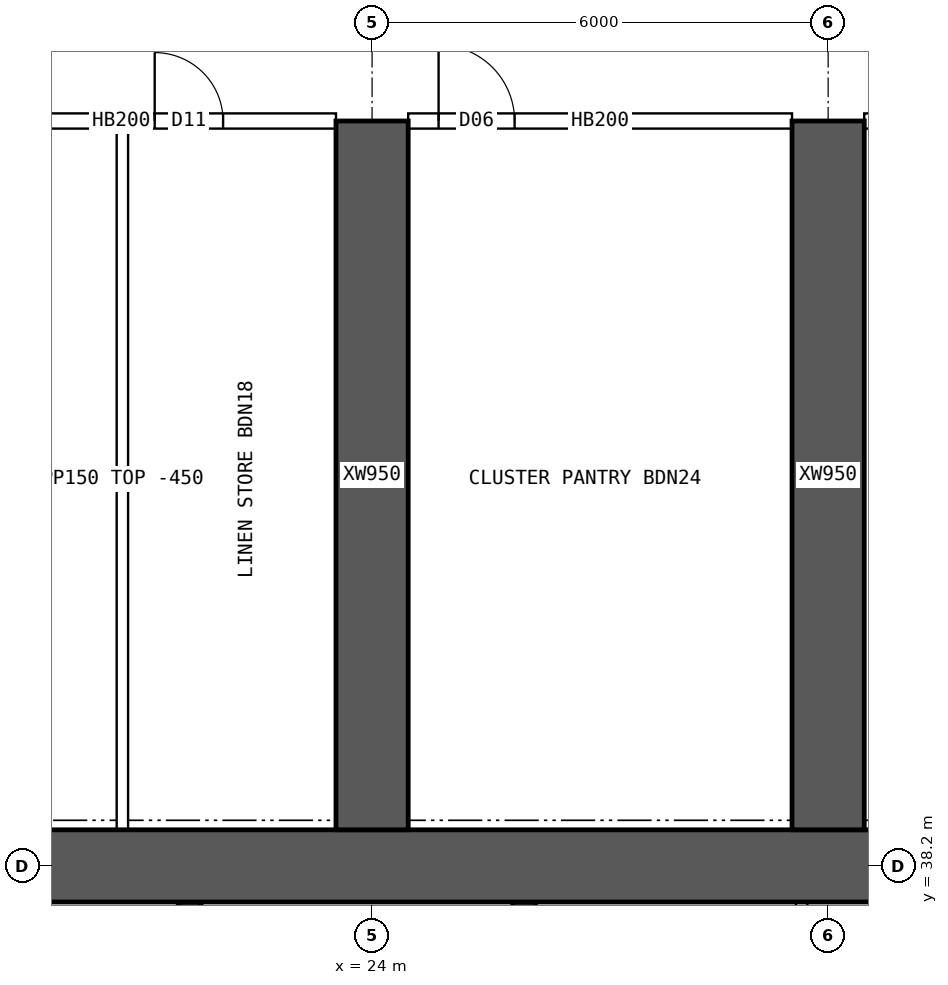
"""IFC4 building model, lengths in metres.
Left out: names, types, materials, properties, quantities, classifications, styles, units other than length and angle.
Written with IfcOpenShell. Run it as: python <this file> out.ifc"""

import sys

from ifc_helpers import new_model, si_unit, direction, frame, frame_2d, origin, place, context, subcontext, project, spatial, rectangle, extrude, element, fill, save


model = new_model("IFC4")
c1 = context("Model", 3, precision=1e-05, world=origin(), true_north=direction((0.0, 1.0)))
c2 = subcontext(c1, "Body", "Model", "MODEL_VIEW")
j1 = project(units=[si_unit("LENGTHUNIT", "METRE"), si_unit("PLANEANGLEUNIT", "RADIAN")], contexts=[c1])
p1 = place(None, origin())
s1 = spatial("IfcSite", under=j1, at=p1, CompositionType="ELEMENT")
p2 = place(p1, origin())
s2 = spatial("IfcBuilding", under=s1, at=p2, CompositionType="ELEMENT")
p3 = place(p2, frame((0.0, 0.0, 95.65)))
s3 = spatial("IfcBuildingStorey", under=s2, at=p3, CompositionType="ELEMENT", Elevation=95.65)
p4 = place(p3, frame((18.0, 38.2, 0.0), z_axis=(0.0, 0.0, 1.0), x_axis=(1.0, 0.0, 0.0)))
e1 = element("IfcWall", 1, at=p4, inside=s3, PredefinedType="SHEAR", context=c2, shape_type="SweptSolid", body=[
    extrude(rectangle(XDim=48.0, YDim=0.95, at=frame_2d((24.0, 0.0))), origin(), (0.0, 0.0, 1.0), 3.75),
])
for number, where, z_axis, x_axis in (
    (2, (21.6, 34.75, 0.0), (0.0, 0.0, 1.0), (0.0, 1.0, 0.0)),
    (3, (26.0, 34.75, 0.0), (0.0, 0.0, 1.0), (0.0, 1.0, 0.0)),
):
    element("IfcWall", number, at=place(p3, frame(where, z_axis=z_axis, x_axis=x_axis)), inside=s3, PredefinedType="SHEAR", context=c2, shape_type="SweptSolid", body=[
        extrude(rectangle(XDim=2.975, YDim=0.3, at=frame_2d((1.488, 0.0))), origin(), (0.0, 0.0, 1.0), 3.75),
    ])
for number, where, z_axis, x_axis in (
    (4, (24.0, 38.675, 0.0), (0.0, 0.0, 1.0), (0.0, 1.0, 0.0)),
    (5, (30.0, 38.675, 0.0), (0.0, 0.0, 1.0), (0.0, 1.0, 0.0)),
):
    element("IfcWall", number, at=place(p3, frame(where, z_axis=z_axis, x_axis=x_axis)), inside=s3, PredefinedType="SHEAR", context=c2, shape_type="SweptSolid", body=[
        extrude(rectangle(XDim=9.325, YDim=0.95, at=frame_2d((4.663, 0.0))), origin(), (0.0, 0.0, 1.0), 3.75),
    ])
p5 = place(p3, frame((29.651, 34.75, 0.0), z_axis=(0.0, 0.0, 1.0), x_axis=(0.0, 1.0, 0.0)))
e6 = element("IfcWall", 6, at=p5, inside=s3, PredefinedType="SOLIDWALL", context=c2, shape_type="SweptSolid", body=[
    extrude(rectangle(XDim=2.975, YDim=0.15, at=frame_2d((1.488, 0.0))), origin(), (0.0, 0.0, 1.0), 3.3),
])
p6 = place(p3, frame((18.475, 48.0, 0.0), z_axis=(0.0, 0.0, 1.0), x_axis=(1.0, 0.0, 0.0)))
e7 = element("IfcWall", 7, at=p6, inside=s3, PredefinedType="SOLIDWALL", context=c2, shape_type="SweptSolid", body=[
    extrude(rectangle(XDim=5.05, YDim=0.2, at=frame_2d((2.525, 0.0))), origin(), (0.0, 0.0, 1.0), 3.3),
])
p7 = place(p6, frame((0.35, 0.0, 0.0)))
e8 = element("IfcOpeningElement", 8, at=p7, cuts=e7, PredefinedType="OPENING", context=c2, shape_type="SweptSolid", body=[
    extrude(rectangle(XDim=0.9, YDim=2.1, at=frame_2d((0.45, 1.05))), frame((0.0, 0.11, 0.0), z_axis=(0.0, -1.0, 0.0), x_axis=(1.0, 0.0, 0.0)), (0.0, 0.0, 1.0), 0.22),
])
p8 = place(p6, frame((2.665, 0.0, 0.0)))
e9 = element("IfcOpeningElement", 9, at=p8, cuts=e7, PredefinedType="OPENING", context=c2, shape_type="SweptSolid", body=[
    extrude(rectangle(XDim=0.9, YDim=2.1, at=frame_2d((0.45, 1.05))), frame((0.0, 0.11, 0.0), z_axis=(0.0, -1.0, 0.0), x_axis=(1.0, 0.0, 0.0)), (0.0, 0.0, 1.0), 0.22),
])
p9 = place(p3, frame((24.475, 48.0, 0.0), z_axis=(0.0, 0.0, 1.0), x_axis=(1.0, 0.0, 0.0)))
e10 = element("IfcWall", 10, at=p9, inside=s3, PredefinedType="SOLIDWALL", context=c2, shape_type="SweptSolid", body=[
    extrude(rectangle(XDim=5.05, YDim=0.2, at=frame_2d((2.525, 0.0))), origin(), (0.0, 0.0, 1.0), 3.3),
])
p10 = place(p9, frame((0.4, 0.0, 0.0)))
e11 = element("IfcOpeningElement", 11, at=p10, cuts=e10, PredefinedType="OPENING", context=c2, shape_type="SweptSolid", body=[
    extrude(rectangle(XDim=1.0, YDim=2.1, at=frame_2d((0.5, 1.05))), frame((0.0, 0.11, 0.0), z_axis=(0.0, -1.0, 0.0), x_axis=(1.0, 0.0, 0.0)), (0.0, 0.0, 1.0), 0.22),
])
p11 = place(p3, frame((30.475, 48.0, 0.0), z_axis=(0.0, 0.0, 1.0), x_axis=(1.0, 0.0, 0.0)))
e12 = element("IfcWall", 12, at=p11, inside=s3, PredefinedType="SOLIDWALL", context=c2, shape_type="SweptSolid", body=[
    extrude(rectangle(XDim=5.05, YDim=0.2, at=frame_2d((2.525, 0.0))), origin(), (0.0, 0.0, 1.0), 3.3),
])
p12 = place(p11, frame((0.35, 0.0, 0.0)))
e13 = element("IfcOpeningElement", 13, at=p12, cuts=e12, PredefinedType="OPENING", context=c2, shape_type="SweptSolid", body=[
    extrude(rectangle(XDim=0.9, YDim=2.1, at=frame_2d((0.45, 1.05))), frame((0.0, 0.11, 0.0), z_axis=(0.0, -1.0, 0.0), x_axis=(1.0, 0.0, 0.0)), (0.0, 0.0, 1.0), 0.22),
])
p13 = place(p11, frame((2.705, 0.0, 0.0)))
e14 = element("IfcOpeningElement", 14, at=p13, cuts=e12, PredefinedType="OPENING", context=c2, shape_type="SweptSolid", body=[
    extrude(rectangle(XDim=0.9, YDim=2.1, at=frame_2d((0.45, 1.05))), frame((0.0, 0.11, 0.0), z_axis=(0.0, -1.0, 0.0), x_axis=(1.0, 0.0, 0.0)), (0.0, 0.0, 1.0), 0.22),
])
p14 = place(p3, frame((20.715, 38.675, 0.0), z_axis=(0.0, 0.0, 1.0), x_axis=(0.0, 1.0, 0.0)))
e15 = element("IfcWall", 15, at=p14, inside=s3, PredefinedType="PARTITIONING", context=c2, shape_type="SweptSolid", body=[
    extrude(rectangle(XDim=9.225, YDim=0.15, at=frame_2d((4.612, 0.0))), origin(), (0.0, 0.0, 1.0), 3.3),
])
p15 = place(p8, origin())
e16 = element("IfcDoor", 16, at=p15, inside=s3, OperationType="SINGLE_SWING_LEFT", PredefinedType="DOOR", context=c2, shape_type="SweptSolid", body=[
    extrude(rectangle(XDim=0.9, YDim=2.1, at=frame_2d((0.45, 1.05))), frame((0.0, 0.025, 0.0), z_axis=(0.0, -1.0, 0.0), x_axis=(1.0, 0.0, 0.0)), (0.0, 0.0, 1.0), 0.05),
])
fill(e9, e16)
p16 = place(p10, origin())
e17 = element("IfcDoor", 17, at=p16, inside=s3, OperationType="SINGLE_SWING_LEFT", PredefinedType="DOOR", context=c2, shape_type="SweptSolid", body=[
    extrude(rectangle(XDim=1.0, YDim=2.1, at=frame_2d((0.5, 1.05))), frame((0.0, 0.025, 0.0), z_axis=(0.0, -1.0, 0.0), x_axis=(1.0, 0.0, 0.0)), (0.0, 0.0, 1.0), 0.05),
])
fill(e11, e17)
save(model, sys.argv[1])
